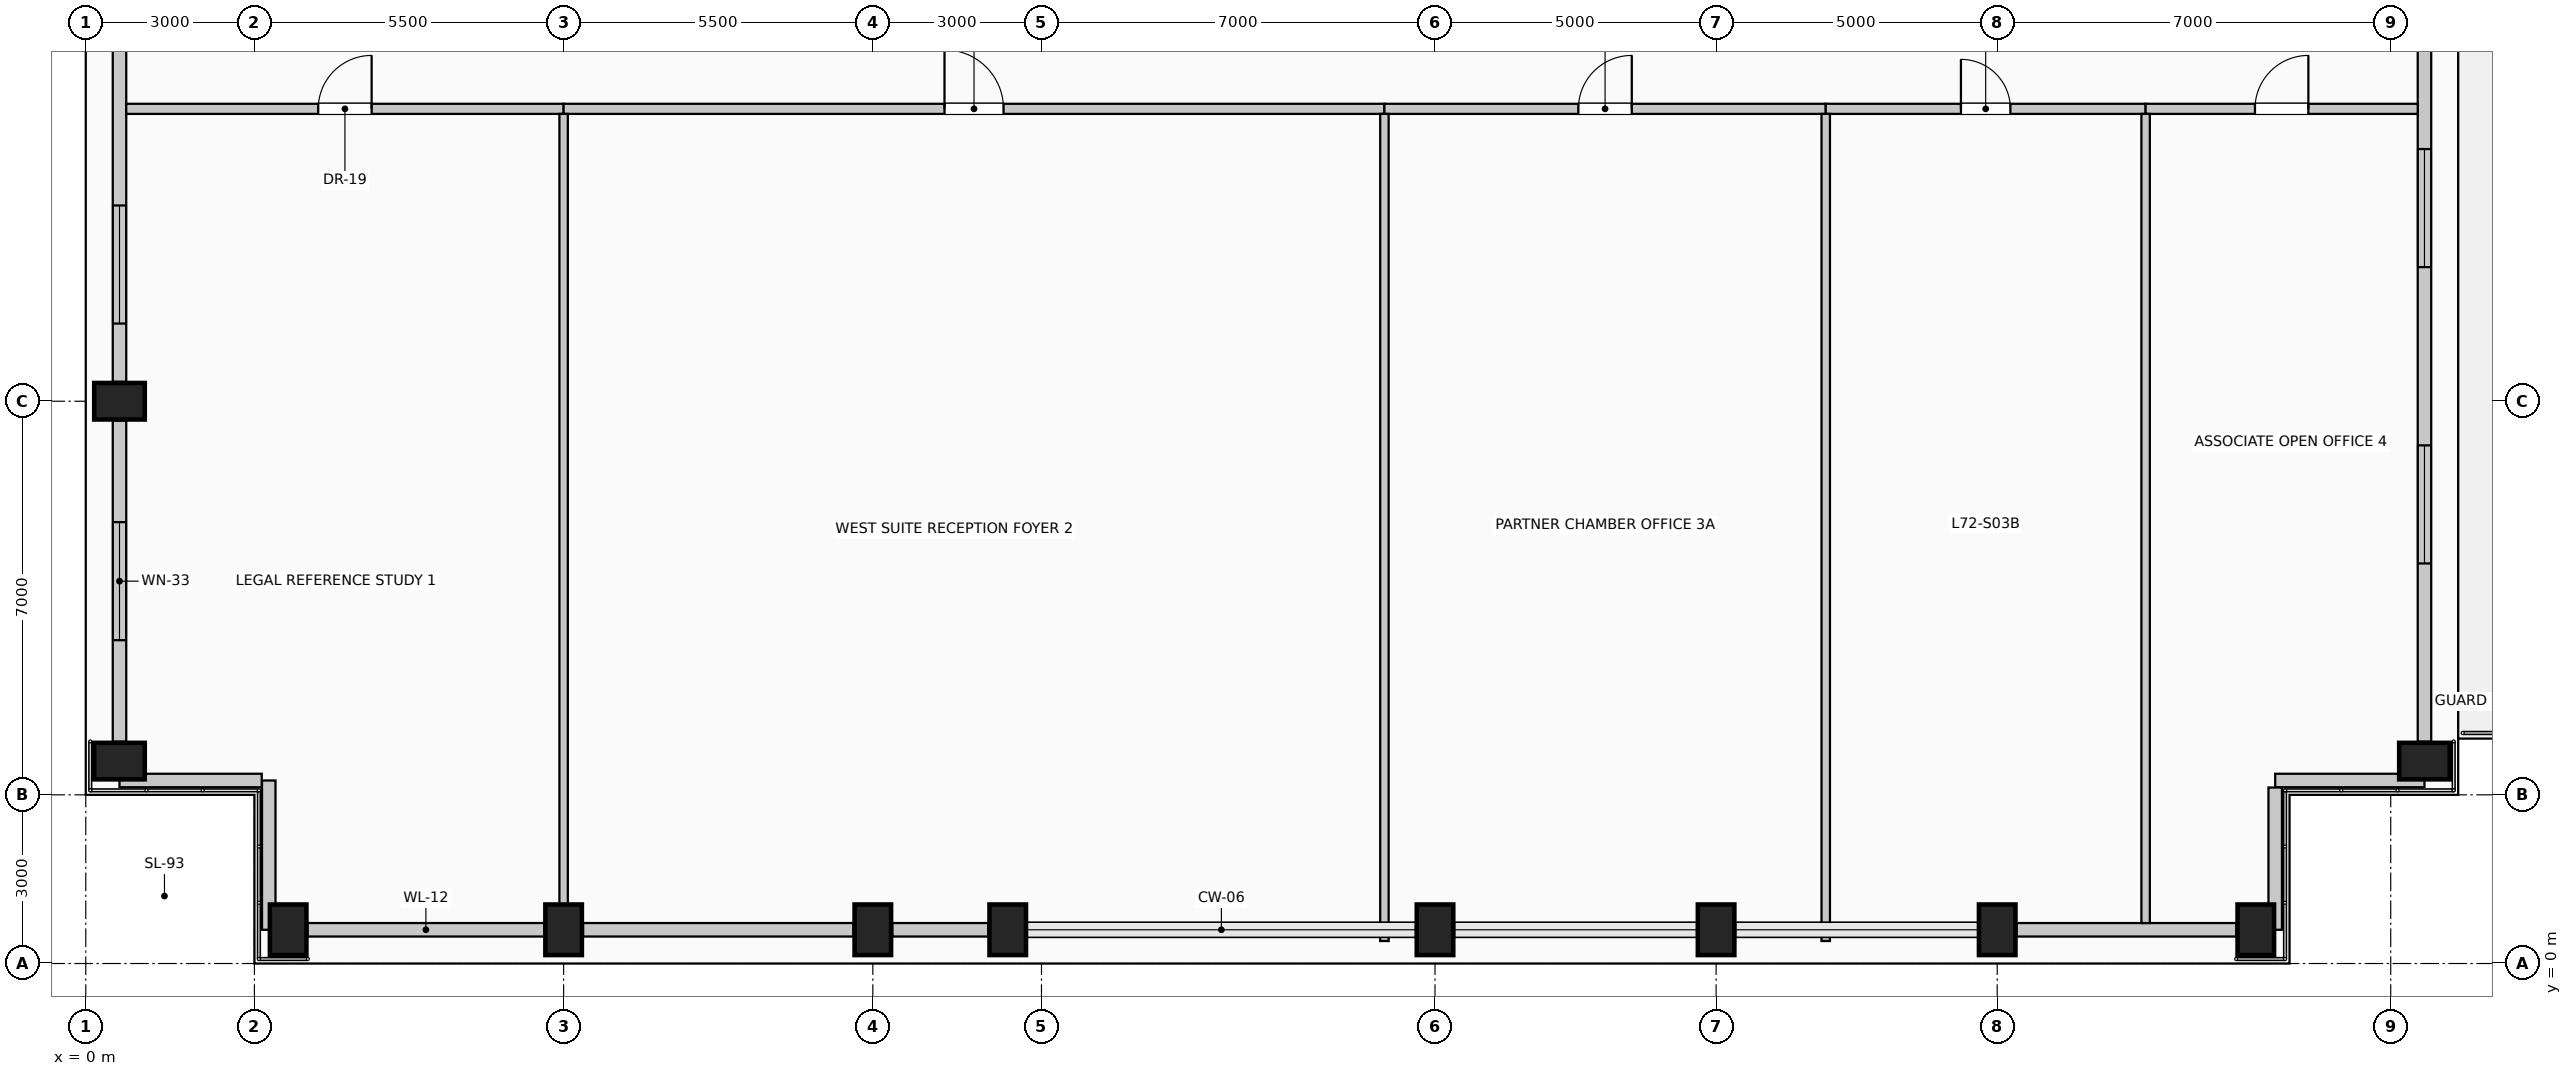
"""IFC4 building model, lengths in metres.
Left out: names, types, materials, properties, quantities, classifications, styles, units other than length and angle.
Written with IfcOpenShell. Run it as: python <this file> out.ifc"""

import sys

from ifc_helpers import new_model, si_unit, direction, frame, frame_2d, origin, origin_2d, place, context, subcontext, project, spatial, rectangle, extrude, element, fill, save


model = new_model("IFC4")
c1 = context("Model", 3, precision=1e-05, world=origin(), true_north=direction((0.0, 1.0)))
c2 = subcontext(c1, "Body", "Model", "MODEL_VIEW")
j1 = project(units=[si_unit("LENGTHUNIT", "METRE"), si_unit("PLANEANGLEUNIT", "RADIAN")], contexts=[c1])
p1 = place(None, origin())
s1 = spatial("IfcSite", under=j1, at=p1, CompositionType="ELEMENT")
p2 = place(p1, origin())
s2 = spatial("IfcBuilding", under=s1, at=p2, CompositionType="ELEMENT")
p3 = place(p2, frame((0.0, 0.0, 297.0)))
s3 = spatial("IfcBuildingStorey", under=s2, at=p3, CompositionType="ELEMENT", Elevation=297.0)
for number, where, z_axis, x_axis in (
    (1, (3.6, 0.6, 0.0), (0.0, 0.0, 1.0), (1.0, 0.0, 0.0)),
    (2, (8.5, 0.6, 0.0), (0.0, 0.0, 1.0), (1.0, 0.0, 0.0)),
    (3, (14.0, 0.6, 0.0), (0.0, 0.0, 1.0), (1.0, 0.0, 0.0)),
    (4, (16.4, 0.6, 0.0), (0.0, 0.0, 1.0), (1.0, 0.0, 0.0)),
    (5, (24.0, 0.6, 0.0), (0.0, 0.0, 1.0), (1.0, 0.0, 0.0)),
    (6, (29.0, 0.6, 0.0), (0.0, 0.0, 1.0), (1.0, 0.0, 0.0)),
    (7, (34.0, 0.6, 0.0), (0.0, 0.0, 1.0), (1.0, 0.0, 0.0)),
    (8, (38.6, 0.6, 0.0), (0.0, 0.0, 1.0), (1.0, 0.0, 0.0)),
    (9, (0.6, 3.6, 0.0), (0.0, 0.0, 1.0), (0.0, 1.0, 0.0)),
    (10, (41.6, 3.6, 0.0), (0.0, 0.0, 1.0), (0.0, 1.0, 0.0)),
    (11, (0.6, 10.0, 0.0), (0.0, 0.0, 1.0), (0.0, 1.0, 0.0)),
):
    element("IfcColumn", number, at=place(p3, frame(where, z_axis=z_axis, x_axis=x_axis)), inside=s3, PredefinedType="COLUMN", context=c2, shape_type="SweptSolid", body=[
        extrude(rectangle(XDim=0.65, YDim=0.9, at=origin_2d()), origin(), (0.0, 0.0, 1.0), 4.0),
    ])
p4 = place(p3, frame((8.155, 0.6, 0.0), z_axis=(0.0, 0.0, 1.0), x_axis=(-1.0, 0.0, 0.0)))
e12 = element("IfcWall", 12, at=p4, inside=s3, PredefinedType="SOLIDWALL", context=c2, shape_type="SweptSolid", body=[
    extrude(rectangle(XDim=4.21, YDim=0.24, at=frame_2d((2.105, 0.0))), origin(), (0.0, 0.0, 1.0), 3.025),
])
p5 = place(p3, frame((13.655, 0.6, 0.0), z_axis=(0.0, 0.0, 1.0), x_axis=(-1.0, 0.0, 0.0)))
e13 = element("IfcWall", 13, at=p5, inside=s3, PredefinedType="SOLIDWALL", context=c2, shape_type="SweptSolid", body=[
    extrude(rectangle(XDim=4.81, YDim=0.24, at=frame_2d((2.405, 0.0))), origin(), (0.0, 0.0, 1.0), 3.025),
])
p6 = place(p3, frame((16.055, 0.6, 0.0), z_axis=(0.0, 0.0, 1.0), x_axis=(-1.0, 0.0, 0.0)))
e14 = element("IfcWall", 14, at=p6, inside=s3, PredefinedType="SOLIDWALL", context=c2, shape_type="SweptSolid", body=[
    extrude(rectangle(XDim=1.71, YDim=0.24, at=frame_2d((0.855, 0.0))), origin(), (0.0, 0.0, 1.0), 3.025),
])
p7 = place(p3, frame((38.255, 0.6, 0.0), z_axis=(0.0, 0.0, 1.0), x_axis=(-1.0, 0.0, 0.0)))
e15 = element("IfcWall", 15, at=p7, inside=s3, PredefinedType="SOLIDWALL", context=c2, shape_type="SweptSolid", body=[
    extrude(rectangle(XDim=3.91, YDim=0.24, at=frame_2d((1.955, 0.0))), origin(), (0.0, 0.0, 1.0), 3.025),
])
p8 = place(p3, frame((0.6, 3.945, 0.0), z_axis=(0.0, 0.0, 1.0), x_axis=(0.0, 1.0, 0.0)))
e16 = element("IfcWall", 16, at=p8, inside=s3, PredefinedType="SOLIDWALL", context=c2, shape_type="SweptSolid", body=[
    extrude(rectangle(XDim=5.71, YDim=0.24, at=frame_2d((2.855, 0.0))), origin(), (0.0, 0.0, 1.0), 3.025),
])
p9 = place(p8, frame((1.805, 0.0, 0.35)))
e17 = element("IfcOpeningElement", 17, at=p9, cuts=e16, PredefinedType="OPENING", context=c2, shape_type="SweptSolid", body=[
    extrude(rectangle(XDim=2.1, YDim=2.2, at=frame_2d((1.05, 1.1))), frame((0.0, 0.13, 0.0), z_axis=(0.0, -1.0, 0.0), x_axis=(1.0, 0.0, 0.0)), (0.0, 0.0, 1.0), 0.26),
])
p10 = place(p3, frame((0.6, 10.345, 0.0), z_axis=(0.0, 0.0, 1.0), x_axis=(0.0, 1.0, 0.0)))
e18 = element("IfcWall", 18, at=p10, inside=s3, PredefinedType="SOLIDWALL", context=c2, shape_type="SweptSolid", body=[
    extrude(rectangle(XDim=7.31, YDim=0.24, at=frame_2d((3.655, 0.0))), origin(), (0.0, 0.0, 1.0), 3.025),
])
p11 = place(p10, frame((1.037, 0.0, 0.35)))
e19 = element("IfcOpeningElement", 19, at=p11, cuts=e18, PredefinedType="OPENING", context=c2, shape_type="SweptSolid", body=[
    extrude(rectangle(XDim=2.1, YDim=2.2, at=frame_2d((1.05, 1.1))), frame((0.0, 0.13, 0.0), z_axis=(0.0, -1.0, 0.0), x_axis=(1.0, 0.0, 0.0)), (0.0, 0.0, 1.0), 0.26),
])
p12 = place(p3, frame((41.6, 17.655, 0.0), z_axis=(0.0, 0.0, 1.0), x_axis=(0.0, -1.0, 0.0)))
e20 = element("IfcWall", 20, at=p12, inside=s3, PredefinedType="SOLIDWALL", context=c2, shape_type="SweptSolid", body=[
    extrude(rectangle(XDim=13.71, YDim=0.24, at=frame_2d((6.855, 0.0))), origin(), (0.0, 0.0, 1.0), 3.025),
])
p13 = place(p12, frame((3.17, 0.0, 0.35)))
e21 = element("IfcOpeningElement", 21, at=p13, cuts=e20, PredefinedType="OPENING", context=c2, shape_type="SweptSolid", body=[
    extrude(rectangle(XDim=2.1, YDim=2.2, at=frame_2d((1.05, 1.1))), frame((0.0, 0.13, 0.0), z_axis=(0.0, -1.0, 0.0), x_axis=(1.0, 0.0, 0.0)), (0.0, 0.0, 1.0), 0.26),
])
p14 = place(p12, frame((8.44, 0.0, 0.35)))
e22 = element("IfcOpeningElement", 22, at=p14, cuts=e20, PredefinedType="OPENING", context=c2, shape_type="SweptSolid", body=[
    extrude(rectangle(XDim=2.1, YDim=2.2, at=frame_2d((1.05, 1.1))), frame((0.0, 0.13, 0.0), z_axis=(0.0, -1.0, 0.0), x_axis=(1.0, 0.0, 0.0)), (0.0, 0.0, 1.0), 0.26),
])
p15 = place(p3, frame((41.6, 3.255, 0.0), z_axis=(0.0, 0.0, 1.0), x_axis=(-1.0, 0.0, 0.0)))
e23 = element("IfcWall", 23, at=p15, inside=s3, PredefinedType="SOLIDWALL", context=c2, shape_type="SweptSolid", body=[
    extrude(rectangle(XDim=2.655, YDim=0.24, at=frame_2d((1.328, 0.0))), origin(), (0.0, 0.0, 1.0), 3.775),
])
p16 = place(p3, frame((38.945, 3.13, 0.0), z_axis=(0.0, 0.0, 1.0), x_axis=(0.0, -1.0, 0.0)))
e24 = element("IfcWall", 24, at=p16, inside=s3, PredefinedType="SOLIDWALL", context=c2, shape_type="SweptSolid", body=[
    extrude(rectangle(XDim=2.53, YDim=0.24, at=frame_2d((1.265, 0.0))), origin(), (0.0, 0.0, 1.0), 3.775),
])
p17 = place(p3, frame((3.255, 0.6, 0.0), z_axis=(0.0, 0.0, 1.0), x_axis=(0.0, 1.0, 0.0)))
e25 = element("IfcWall", 25, at=p17, inside=s3, PredefinedType="SOLIDWALL", context=c2, shape_type="SweptSolid", body=[
    extrude(rectangle(XDim=2.655, YDim=0.24, at=frame_2d((1.327, 0.0))), origin(), (0.0, 0.0, 1.0), 3.775),
])
p18 = place(p3, frame((3.13, 3.255, 0.0), z_axis=(0.0, 0.0, 1.0), x_axis=(-1.0, 0.0, 0.0)))
e26 = element("IfcWall", 26, at=p18, inside=s3, PredefinedType="SOLIDWALL", context=c2, shape_type="SweptSolid", body=[
    extrude(rectangle(XDim=2.53, YDim=0.24, at=frame_2d((1.265, 0.0))), origin(), (0.0, 0.0, 1.0), 3.775),
])
p19 = place(p3, frame((0.72, 15.2, 0.0), z_axis=(0.0, 0.0, 1.0), x_axis=(1.0, 0.0, 0.0)))
e27 = element("IfcWall", 27, at=p19, inside=s3, PredefinedType="PARTITIONING", context=c2, shape_type="SweptSolid", body=[
    extrude(rectangle(XDim=7.78, YDim=0.18, at=frame_2d((3.89, 0.0))), origin(), (0.0, 0.0, 1.0), 3.775),
])
p20 = place(p19, frame((3.415, 0.0, 0.0)))
e28 = element("IfcOpeningElement", 28, at=p20, cuts=e27, PredefinedType="OPENING", context=c2, shape_type="SweptSolid", body=[
    extrude(rectangle(XDim=0.95, YDim=2.15, at=frame_2d((0.475, 1.075))), frame((0.0, 0.1, 0.0), z_axis=(0.0, -1.0, 0.0), x_axis=(1.0, 0.0, 0.0)), (0.0, 0.0, 1.0), 0.2),
])
p21 = place(p3, frame((8.5, 15.2, 0.0), z_axis=(0.0, 0.0, 1.0), x_axis=(1.0, 0.0, 0.0)))
e29 = element("IfcWall", 29, at=p21, inside=s3, PredefinedType="PARTITIONING", context=c2, shape_type="SweptSolid", body=[
    extrude(rectangle(XDim=14.6, YDim=0.18, at=frame_2d((7.3, 0.0))), origin(), (0.0, 0.0, 1.0), 3.775),
])
p22 = place(p21, frame((6.775, 0.0, 0.0)))
e30 = element("IfcOpeningElement", 30, at=p22, cuts=e29, PredefinedType="OPENING", context=c2, shape_type="SweptSolid", body=[
    extrude(rectangle(XDim=1.05, YDim=2.15, at=frame_2d((0.525, 1.075))), frame((0.0, 0.1, 0.0), z_axis=(0.0, -1.0, 0.0), x_axis=(1.0, 0.0, 0.0)), (0.0, 0.0, 1.0), 0.2),
])
p23 = place(p3, frame((23.1, 15.2, 0.0), z_axis=(0.0, 0.0, 1.0), x_axis=(1.0, 0.0, 0.0)))
e31 = element("IfcWall", 31, at=p23, inside=s3, PredefinedType="PARTITIONING", context=c2, shape_type="SweptSolid", body=[
    extrude(rectangle(XDim=7.85, YDim=0.18, at=frame_2d((3.925, 0.0))), origin(), (0.0, 0.0, 1.0), 3.775),
])
p24 = place(p23, frame((3.45, 0.0, 0.0)))
e32 = element("IfcOpeningElement", 32, at=p24, cuts=e31, PredefinedType="OPENING", context=c2, shape_type="SweptSolid", body=[
    extrude(rectangle(XDim=0.95, YDim=2.15, at=frame_2d((0.475, 1.075))), frame((0.0, 0.1, 0.0), z_axis=(0.0, -1.0, 0.0), x_axis=(1.0, 0.0, 0.0)), (0.0, 0.0, 1.0), 0.2),
])
p25 = place(p3, frame((30.95, 15.2, 0.0), z_axis=(0.0, 0.0, 1.0), x_axis=(1.0, 0.0, 0.0)))
e33 = element("IfcWall", 33, at=p25, inside=s3, PredefinedType="PARTITIONING", context=c2, shape_type="SweptSolid", body=[
    extrude(rectangle(XDim=5.69, YDim=0.18, at=frame_2d((2.845, 0.0))), origin(), (0.0, 0.0, 1.0), 3.775),
])
p26 = place(p25, frame((2.405, 0.0, 0.0)))
e34 = element("IfcOpeningElement", 34, at=p26, cuts=e33, PredefinedType="OPENING", context=c2, shape_type="SweptSolid", body=[
    extrude(rectangle(XDim=0.88, YDim=2.1, at=frame_2d((0.44, 1.05))), frame((0.0, 0.1, 0.0), z_axis=(0.0, -1.0, 0.0), x_axis=(1.0, 0.0, 0.0)), (0.0, 0.0, 1.0), 0.2),
])
p27 = place(p3, frame((36.64, 15.2, 0.0), z_axis=(0.0, 0.0, 1.0), x_axis=(1.0, 0.0, 0.0)))
e35 = element("IfcWall", 35, at=p27, inside=s3, PredefinedType="PARTITIONING", context=c2, shape_type="SweptSolid", body=[
    extrude(rectangle(XDim=4.84, YDim=0.18, at=frame_2d((2.42, 0.0))), origin(), (0.0, 0.0, 1.0), 3.775),
])
p28 = place(p27, frame((1.945, 0.0, 0.0)))
e36 = element("IfcOpeningElement", 36, at=p28, cuts=e35, PredefinedType="OPENING", context=c2, shape_type="SweptSolid", body=[
    extrude(rectangle(XDim=0.95, YDim=2.15, at=frame_2d((0.475, 1.075))), frame((0.0, 0.1, 0.0), z_axis=(0.0, -1.0, 0.0), x_axis=(1.0, 0.0, 0.0)), (0.0, 0.0, 1.0), 0.2),
])
p29 = place(p3, frame((8.5, 1.05, 0.0), z_axis=(0.0, 0.0, 1.0), x_axis=(0.0, 1.0, 0.0)))
e37 = element("IfcWall", 37, at=p29, inside=s3, PredefinedType="PARTITIONING", context=c2, shape_type="SweptSolid", body=[
    extrude(rectangle(XDim=14.06, YDim=0.15, at=frame_2d((7.03, 0.0))), origin(), (0.0, 0.0, 1.0), 3.775),
])
for number, where, z_axis, x_axis in (
    (38, (23.1, 0.4, 0.0), (0.0, 0.0, 1.0), (0.0, 1.0, 0.0)),
    (39, (30.95, 0.4, 0.0), (0.0, 0.0, 1.0), (0.0, 1.0, 0.0)),
):
    element("IfcWall", number, at=place(p3, frame(where, z_axis=z_axis, x_axis=x_axis)), inside=s3, PredefinedType="PARTITIONING", context=c2, shape_type="SweptSolid", body=[
        extrude(rectangle(XDim=14.71, YDim=0.15, at=frame_2d((7.355, 0.0))), origin(), (0.0, 0.0, 1.0), 3.775),
    ])
p30 = place(p3, frame((36.64, 0.72, 0.0), z_axis=(0.0, 0.0, 1.0), x_axis=(0.0, 1.0, 0.0)))
e40 = element("IfcWall", 40, at=p30, inside=s3, PredefinedType="PARTITIONING", context=c2, shape_type="SweptSolid", body=[
    extrude(rectangle(XDim=14.39, YDim=0.15, at=frame_2d((7.195, 0.0))), origin(), (0.0, 0.0, 1.0), 3.775),
])
p31 = place(p9, origin())
e41 = element("IfcWindow", 41, at=p31, inside=s3, PartitioningType="SINGLE_PANEL", PredefinedType="WINDOW", context=c2, shape_type="SweptSolid", body=[
    extrude(rectangle(XDim=2.1, YDim=2.2, at=frame_2d((1.05, 1.1))), frame((0.0, 0.03, 0.0), z_axis=(0.0, -1.0, 0.0), x_axis=(1.0, 0.0, 0.0)), (0.0, 0.0, 1.0), 0.06),
])
fill(e17, e41)
p32 = place(p11, origin())
e42 = element("IfcWindow", 42, at=p32, inside=s3, PartitioningType="SINGLE_PANEL", PredefinedType="WINDOW", context=c2, shape_type="SweptSolid", body=[
    extrude(rectangle(XDim=2.1, YDim=2.2, at=frame_2d((1.05, 1.1))), frame((0.0, 0.03, 0.0), z_axis=(0.0, -1.0, 0.0), x_axis=(1.0, 0.0, 0.0)), (0.0, 0.0, 1.0), 0.06),
])
fill(e19, e42)
p33 = place(p13, origin())
e43 = element("IfcWindow", 43, at=p33, inside=s3, PartitioningType="SINGLE_PANEL", PredefinedType="WINDOW", context=c2, shape_type="SweptSolid", body=[
    extrude(rectangle(XDim=2.1, YDim=2.2, at=frame_2d((1.05, 1.1))), frame((0.0, 0.03, 0.0), z_axis=(0.0, -1.0, 0.0), x_axis=(1.0, 0.0, 0.0)), (0.0, 0.0, 1.0), 0.06),
])
fill(e21, e43)
p34 = place(p14, origin())
e44 = element("IfcWindow", 44, at=p34, inside=s3, PartitioningType="SINGLE_PANEL", PredefinedType="WINDOW", context=c2, shape_type="SweptSolid", body=[
    extrude(rectangle(XDim=2.1, YDim=2.2, at=frame_2d((1.05, 1.1))), frame((0.0, 0.03, 0.0), z_axis=(0.0, -1.0, 0.0), x_axis=(1.0, 0.0, 0.0)), (0.0, 0.0, 1.0), 0.06),
])
fill(e22, e44)
p35 = place(p20, origin())
e45 = element("IfcDoor", 45, at=p35, inside=s3, OperationType="SINGLE_SWING_RIGHT", PredefinedType="DOOR", context=c2, shape_type="SweptSolid", body=[
    extrude(rectangle(XDim=0.95, YDim=2.15, at=frame_2d((0.475, 1.075))), frame((0.0, 0.025, 0.0), z_axis=(0.0, -1.0, 0.0), x_axis=(1.0, 0.0, 0.0)), (0.0, 0.0, 1.0), 0.05),
])
fill(e28, e45)
p36 = place(p22, origin())
e46 = element("IfcDoor", 46, at=p36, inside=s3, OperationType="SINGLE_SWING_LEFT", PredefinedType="DOOR", context=c2, shape_type="SweptSolid", body=[
    extrude(rectangle(XDim=1.05, YDim=2.15, at=frame_2d((0.525, 1.075))), frame((0.0, 0.025, 0.0), z_axis=(0.0, -1.0, 0.0), x_axis=(1.0, 0.0, 0.0)), (0.0, 0.0, 1.0), 0.05),
])
fill(e30, e46)
p37 = place(p24, origin())
e47 = element("IfcDoor", 47, at=p37, inside=s3, OperationType="SINGLE_SWING_RIGHT", PredefinedType="DOOR", context=c2, shape_type="SweptSolid", body=[
    extrude(rectangle(XDim=0.95, YDim=2.15, at=frame_2d((0.475, 1.075))), frame((0.0, 0.025, 0.0), z_axis=(0.0, -1.0, 0.0), x_axis=(1.0, 0.0, 0.0)), (0.0, 0.0, 1.0), 0.05),
])
fill(e32, e47)
p38 = place(p26, origin())
e48 = element("IfcDoor", 48, at=p38, inside=s3, OperationType="SINGLE_SWING_LEFT", PredefinedType="DOOR", context=c2, shape_type="SweptSolid", body=[
    extrude(rectangle(XDim=0.88, YDim=2.1, at=frame_2d((0.44, 1.05))), frame((0.0, 0.025, 0.0), z_axis=(0.0, -1.0, 0.0), x_axis=(1.0, 0.0, 0.0)), (0.0, 0.0, 1.0), 0.05),
])
fill(e34, e48)
p39 = place(p28, origin())
e49 = element("IfcDoor", 49, at=p39, inside=s3, OperationType="SINGLE_SWING_RIGHT", PredefinedType="DOOR", context=c2, shape_type="SweptSolid", body=[
    extrude(rectangle(XDim=0.95, YDim=2.15, at=frame_2d((0.475, 1.075))), frame((0.0, 0.025, 0.0), z_axis=(0.0, -1.0, 0.0), x_axis=(1.0, 0.0, 0.0)), (0.0, 0.0, 1.0), 0.05),
])
fill(e36, e49)
save(model, sys.argv[1])
